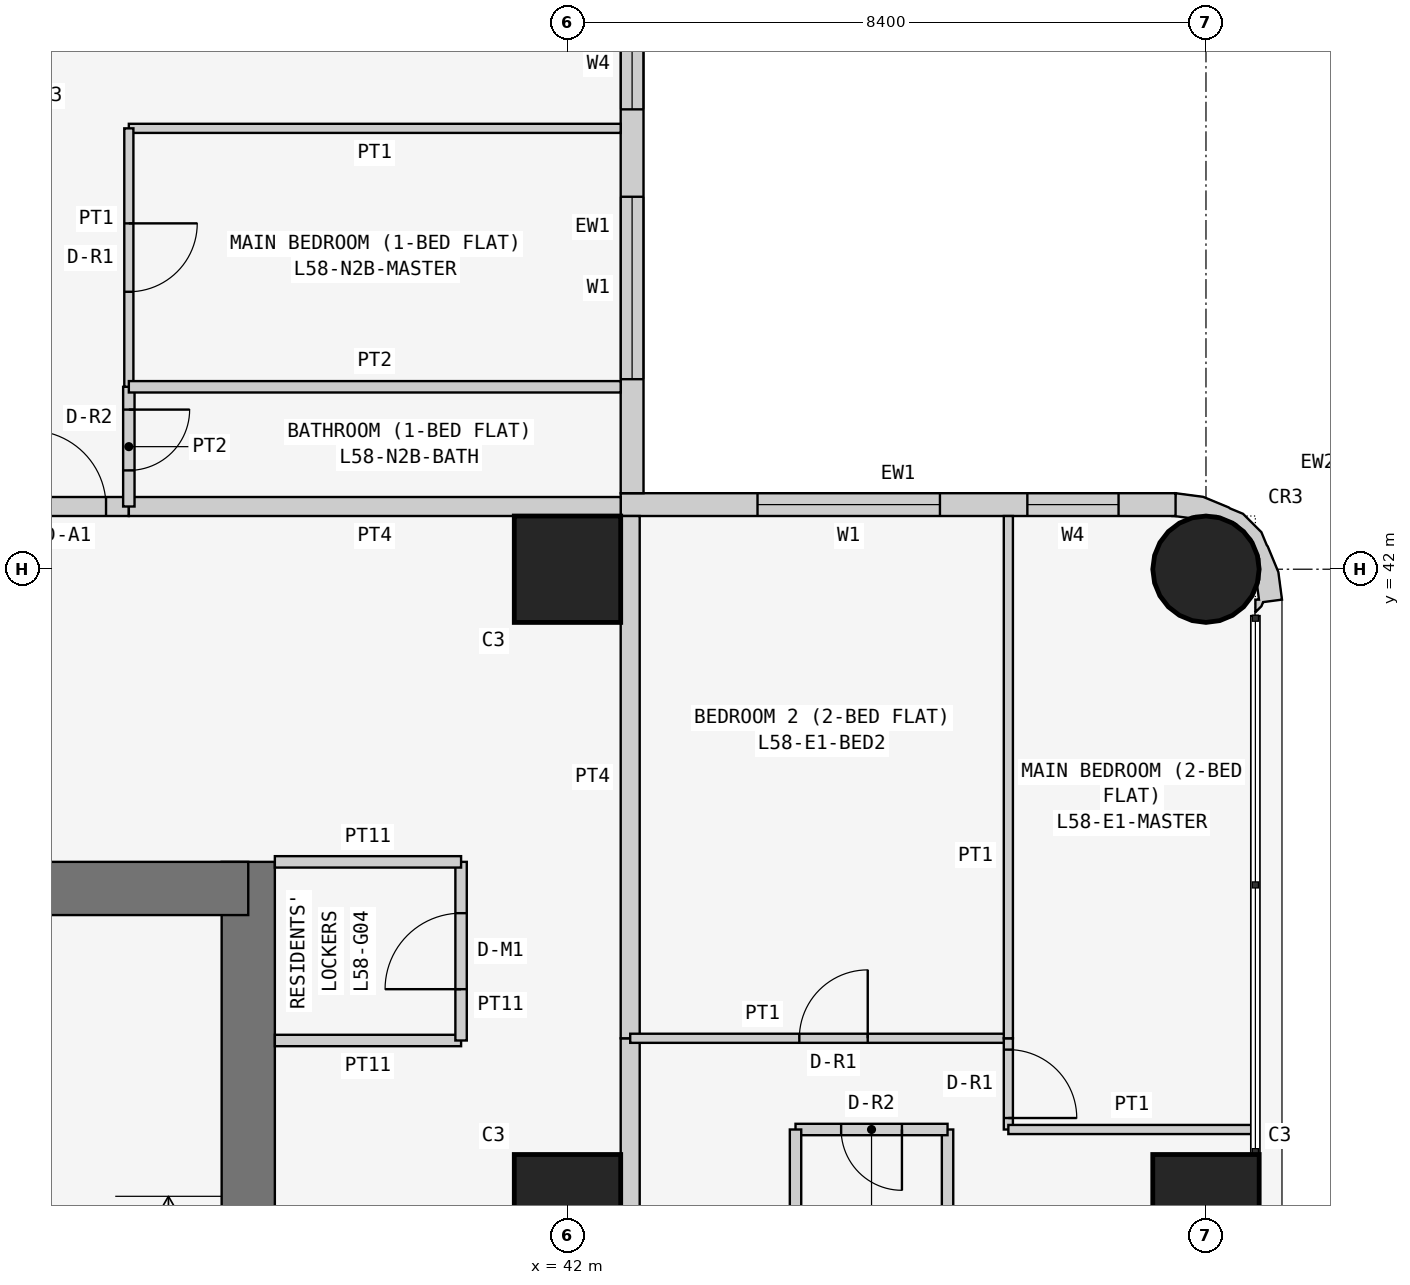
"""IFC4 building model, lengths in metres.
Left out: names, types, materials, properties, quantities, classifications, styles, units other than length and angle.
Written with IfcOpenShell. Run it as: python <this file> out.ifc"""

import sys

from ifc_helpers import new_model, si_unit, direction, frame, frame_2d, origin, origin_2d, place, context, subcontext, project, spatial, polyline, rectangle, circle, outline, extrude, element, fill, save


model = new_model("IFC4")
c1 = context("Model", 3, precision=1e-05, world=origin(), true_north=direction((0.0, 1.0)))
c2 = subcontext(c1, "Body", "Model", "MODEL_VIEW")
j1 = project(units=[si_unit("LENGTHUNIT", "METRE"), si_unit("PLANEANGLEUNIT", "RADIAN")], contexts=[c1])
p1 = place(None, origin())
s1 = spatial("IfcSite", under=j1, at=p1, CompositionType="ELEMENT")
p2 = place(p1, origin())
s2 = spatial("IfcBuilding", under=s1, at=p2, CompositionType="ELEMENT")
p3 = place(p2, frame((0.0, 0.0, 222.9)))
s3 = spatial("IfcBuildingStorey", under=s2, at=p3, CompositionType="ELEMENT", Elevation=222.9)
for number, where, z_axis, x_axis in (
    (1, (42.0, 33.6, 0.0), (0.0, 0.0, 1.0), (1.0, 0.0, 0.0)),
    (2, (42.0, 42.0, 0.0), (0.0, 0.0, 1.0), (1.0, 0.0, 0.0)),
    (3, (50.4, 33.6, 0.0), (0.0, 0.0, 1.0), (1.0, 0.0, 0.0)),
):
    element("IfcColumn", number, at=place(p3, frame(where, z_axis=z_axis, x_axis=x_axis)), inside=s3, PredefinedType="COLUMN", context=c2, shape_type="SweptSolid", body=[
        extrude(rectangle(XDim=1.4, YDim=1.4, at=origin_2d()), origin(), (0.0, 0.0, 1.0), 3.6),
    ])
p4 = place(p3, frame((50.4, 42.0, 0.0), z_axis=(0.0, 0.0, 1.0), x_axis=(1.0, 0.0, 0.0)))
e4 = element("IfcColumn", 4, at=p4, inside=s3, PredefinedType="COLUMN", context=c2, shape_type="SweptSolid", body=[
    extrude(circle(Radius=0.7, at=origin_2d()), origin(), (0.0, 0.0, 1.0), 3.6),
])
p5 = place(p3, frame((37.8, 21.0, 0.0), z_axis=(0.0, 0.0, 1.0), x_axis=(0.0, 1.0, 0.0)))
e5 = element("IfcWall", 5, at=p5, inside=s3, PredefinedType="SHEAR", context=c2, shape_type="SweptSolid", body=[
    extrude(rectangle(XDim=17.15, YDim=0.7, at=frame_2d((8.575, 0.0))), origin(), (0.0, 0.0, 1.0), 3.6),
])
p6 = place(p5, frame((5.2, 0.0, 0.0)))
e6 = element("IfcOpeningElement", 6, at=p6, cuts=e5, PredefinedType="OPENING", context=c2, shape_type="SweptSolid", body=[
    extrude(rectangle(XDim=1.2, YDim=2.1, at=frame_2d((0.6, 1.05))), frame((0.0, 0.36, 0.0), z_axis=(0.0, -1.0, 0.0), x_axis=(1.0, 0.0, 0.0)), (0.0, 0.0, 1.0), 0.72),
])
p7 = place(p3, frame((37.8, 37.8, 0.0), z_axis=(0.0, 0.0, 1.0), x_axis=(-1.0, 0.0, 0.0)))
e7 = element("IfcWall", 7, at=p7, inside=s3, PredefinedType="SHEAR", context=c2, shape_type="SweptSolid", body=[
    extrude(rectangle(XDim=17.15, YDim=0.7, at=frame_2d((8.575, 0.0))), origin(), (0.0, 0.0, 1.0), 3.6),
])
p8 = place(p3, frame((50.0, 42.85, 0.0), z_axis=(0.0, 0.0, 1.0), x_axis=(-1.0, 0.0, 0.0)))
e8 = element("IfcWall", 8, at=p8, inside=s3, PredefinedType="SOLIDWALL", context=c2, shape_type="SweptSolid", body=[
    extrude(rectangle(XDim=7.3, YDim=0.3, at=frame_2d((3.65, 0.0))), origin(), (0.0, 0.0, 1.0), 3.45),
])
p9 = place(p8, frame((3.1, 0.0, 0.9)))
e9 = element("IfcOpeningElement", 9, at=p9, cuts=e8, PredefinedType="OPENING", context=c2, shape_type="SweptSolid", body=[
    extrude(rectangle(XDim=2.4, YDim=1.5, at=frame_2d((1.2, 0.75))), frame((0.0, 0.16, 0.0), z_axis=(0.0, -1.0, 0.0), x_axis=(1.0, 0.0, 0.0)), (0.0, 0.0, 1.0), 0.32),
])
p10 = place(p8, frame((0.75, 0.0, 0.9)))
e10 = element("IfcOpeningElement", 10, at=p10, cuts=e8, PredefinedType="OPENING", context=c2, shape_type="SweptSolid", body=[
    extrude(rectangle(XDim=1.2, YDim=1.5, at=frame_2d((0.6, 0.75))), frame((0.0, 0.16, 0.0), z_axis=(0.0, -1.0, 0.0), x_axis=(1.0, 0.0, 0.0)), (0.0, 0.0, 1.0), 0.32),
])
p11 = place(p3, frame((42.85, 43.0, 0.0), z_axis=(0.0, 0.0, 1.0), x_axis=(0.0, 1.0, 0.0)))
e11 = element("IfcWall", 11, at=p11, inside=s3, PredefinedType="SOLIDWALL", context=c2, shape_type="SweptSolid", body=[
    extrude(rectangle(XDim=7.0, YDim=0.3, at=frame_2d((3.5, 0.0))), origin(), (0.0, 0.0, 1.0), 3.45),
])
p12 = place(p11, frame((1.5, 0.0, 0.9)))
e12 = element("IfcOpeningElement", 12, at=p12, cuts=e11, PredefinedType="OPENING", context=c2, shape_type="SweptSolid", body=[
    extrude(rectangle(XDim=2.4, YDim=1.5, at=frame_2d((1.2, 0.75))), frame((0.0, 0.16, 0.0), z_axis=(0.0, -1.0, 0.0), x_axis=(1.0, 0.0, 0.0)), (0.0, 0.0, 1.0), 0.32),
])
p13 = place(p11, frame((5.05, 0.0, 0.9)))
e13 = element("IfcOpeningElement", 13, at=p13, cuts=e11, PredefinedType="OPENING", context=c2, shape_type="SweptSolid", body=[
    extrude(rectangle(XDim=1.2, YDim=1.5, at=frame_2d((0.6, 0.75))), frame((0.0, 0.16, 0.0), z_axis=(0.0, -1.0, 0.0), x_axis=(1.0, 0.0, 0.0)), (0.0, 0.0, 1.0), 0.32),
])
p14 = place(p3, frame((50.988, 41.488, 0.0), z_axis=(0.0, 0.0, 1.0), x_axis=(0.898030234854, 0.439933741929, 0.0)))
e14 = element("IfcWall", 14, at=p14, inside=s3, PredefinedType="SOLIDWALL", context=c2, shape_type="SweptSolid", body=[
    extrude(outline(polyline([(0.138, -0.04), (0.182, -0.0), (0.419, -0.08), (0.536, 0.266), (0.559, 0.631), (0.555, 0.651), (0.566, 0.836), (0.455, 1.159), (0.333, 1.298), (0.324, 1.317), (0.082, 1.591), (-0.222, 1.793), (-0.39, 1.541), (-0.372, 1.532), (-0.195, 1.414), (-0.12, 1.41), (0.131, 1.287), (0.315, 1.078), (0.406, 0.814), (0.388, 0.536), (0.265, 0.285), (0.209, 0.235), (0.148, 0.053), (0.105, 0.074), (0.032, -0.076), (0.138, -0.04)])), origin(), (0.0, 0.0, 1.0), 3.45),
])
p15 = place(p3, frame((38.15, 35.8, 0.0), z_axis=(0.0, 0.0, 1.0), x_axis=(1.0, 0.0, 0.0)))
e15 = element("IfcWall", 15, at=p15, inside=s3, PredefinedType="PARTITIONING", context=c2, shape_type="SweptSolid", body=[
    extrude(rectangle(XDim=2.45, YDim=0.15, at=frame_2d((1.225, 0.0))), origin(), (0.0, 0.0, 1.0), 3.45),
])
p16 = place(p3, frame((40.6, 35.8, 0.0), z_axis=(0.0, 0.0, 1.0), x_axis=(0.0, 1.0, 0.0)))
e16 = element("IfcWall", 16, at=p16, inside=s3, PredefinedType="PARTITIONING", context=c2, shape_type="SweptSolid", body=[
    extrude(rectangle(XDim=2.35, YDim=0.15, at=frame_2d((1.175, 0.0))), origin(), (0.0, 0.0, 1.0), 3.45),
])
p17 = place(p16, frame((0.675, 0.0, 0.0)))
e17 = element("IfcOpeningElement", 17, at=p17, cuts=e16, PredefinedType="OPENING", context=c2, shape_type="SweptSolid", body=[
    extrude(rectangle(XDim=1.0, YDim=2.1, at=frame_2d((0.5, 1.05))), frame((0.0, 0.085, 0.0), z_axis=(0.0, -1.0, 0.0), x_axis=(1.0, 0.0, 0.0)), (0.0, 0.0, 1.0), 0.17),
])
p18 = place(p3, frame((40.6, 38.15, 0.0), z_axis=(0.0, 0.0, 1.0), x_axis=(-1.0, 0.0, 0.0)))
e18 = element("IfcWall", 18, at=p18, inside=s3, PredefinedType="PARTITIONING", context=c2, shape_type="SweptSolid", body=[
    extrude(rectangle(XDim=2.45, YDim=0.15, at=frame_2d((1.225, 0.0))), origin(), (0.0, 0.0, 1.0), 3.45),
])
p19 = place(p3, frame((34.629, 42.825, 0.0), z_axis=(0.0, 0.0, 1.0), x_axis=(1.0, 0.0, 0.0)))
e19 = element("IfcWall", 19, at=p19, inside=s3, PredefinedType="PARTITIONING", context=c2, shape_type="SweptSolid", body=[
    extrude(rectangle(XDim=1.6, YDim=0.25, at=frame_2d((0.8, 0.0))), origin(), (0.0, 0.0, 1.0), 3.45),
])
p20 = place(p19, frame((0.3, 0.0, 0.0)))
e20 = element("IfcOpeningElement", 20, at=p20, cuts=e19, PredefinedType="OPENING", context=c2, shape_type="SweptSolid", body=[
    extrude(rectangle(XDim=1.0, YDim=2.1, at=frame_2d((0.5, 1.05))), frame((0.0, 0.135, 0.0), z_axis=(0.0, -1.0, 0.0), x_axis=(1.0, 0.0, 0.0)), (0.0, 0.0, 1.0), 0.27),
])
p21 = place(p3, frame((36.229, 42.825, 0.0), z_axis=(0.0, 0.0, 1.0), x_axis=(1.0, 0.0, 0.0)))
e21 = element("IfcWall", 21, at=p21, inside=s3, PredefinedType="PARTITIONING", context=c2, shape_type="SweptSolid", body=[
    extrude(rectangle(XDim=6.471, YDim=0.25, at=frame_2d((3.235, 0.0))), origin(), (0.0, 0.0, 1.0), 3.45),
])
p22 = place(p3, frame((42.825, 35.829, 0.0), z_axis=(0.0, 0.0, 1.0), x_axis=(0.0, -1.0, 0.0)))
e22 = element("IfcWall", 22, at=p22, inside=s3, PredefinedType="PARTITIONING", context=c2, shape_type="SweptSolid", body=[
    extrude(rectangle(XDim=6.429, YDim=0.25, at=frame_2d((3.215, 0.0))), origin(), (0.0, 0.0, 1.0), 3.45),
])
p23 = place(p22, frame((4.929, 0.0, 0.0)))
e23 = element("IfcOpeningElement", 23, at=p23, cuts=e22, PredefinedType="OPENING", context=c2, shape_type="SweptSolid", body=[
    extrude(rectangle(XDim=1.0, YDim=2.1, at=frame_2d((0.5, 1.05))), frame((0.0, 0.135, 0.0), z_axis=(0.0, -1.0, 0.0), x_axis=(1.0, 0.0, 0.0)), (0.0, 0.0, 1.0), 0.27),
])
p24 = place(p3, frame((42.825, 42.7, 0.0), z_axis=(0.0, 0.0, 1.0), x_axis=(0.0, -1.0, 0.0)))
e24 = element("IfcWall", 24, at=p24, inside=s3, PredefinedType="PARTITIONING", context=c2, shape_type="SweptSolid", body=[
    extrude(rectangle(XDim=6.871, YDim=0.25, at=frame_2d((3.436, 0.0))), origin(), (0.0, 0.0, 1.0), 3.45),
])
p25 = place(p3, frame((36.229, 44.4, 0.0), z_axis=(0.0, 0.0, 1.0), x_axis=(0.0, -1.0, 0.0)))
e25 = element("IfcWall", 25, at=p25, inside=s3, PredefinedType="PARTITIONING", context=c2, shape_type="SweptSolid", body=[
    extrude(rectangle(XDim=1.575, YDim=0.15, at=frame_2d((0.788, 0.0))), origin(), (0.0, 0.0, 1.0), 3.45),
])
p26 = place(p25, frame((0.3, 0.0, 0.0)))
e26 = element("IfcOpeningElement", 26, at=p26, cuts=e25, PredefinedType="OPENING", context=c2, shape_type="SweptSolid", body=[
    extrude(rectangle(XDim=0.8, YDim=2.1, at=frame_2d((0.4, 1.05))), frame((0.0, 0.085, 0.0), z_axis=(0.0, -1.0, 0.0), x_axis=(1.0, 0.0, 0.0)), (0.0, 0.0, 1.0), 0.17),
])
p27 = place(p3, frame((42.7, 47.8, 0.0), z_axis=(0.0, 0.0, 1.0), x_axis=(-1.0, 0.0, 0.0)))
e27 = element("IfcWall", 27, at=p27, inside=s3, PredefinedType="PARTITIONING", context=c2, shape_type="SweptSolid", body=[
    extrude(rectangle(XDim=6.471, YDim=0.12, at=frame_2d((3.235, 0.0))), origin(), (0.0, 0.0, 1.0), 3.45),
])
p28 = place(p3, frame((36.229, 47.8, 0.0), z_axis=(0.0, 0.0, 1.0), x_axis=(0.0, -1.0, 0.0)))
e28 = element("IfcWall", 28, at=p28, inside=s3, PredefinedType="PARTITIONING", context=c2, shape_type="SweptSolid", body=[
    extrude(rectangle(XDim=3.4, YDim=0.12, at=frame_2d((1.7, 0.0))), origin(), (0.0, 0.0, 1.0), 3.45),
])
p29 = place(p28, frame((1.25, 0.0, 0.0)))
e29 = element("IfcOpeningElement", 29, at=p29, cuts=e28, PredefinedType="OPENING", context=c2, shape_type="SweptSolid", body=[
    extrude(rectangle(XDim=0.9, YDim=2.1, at=frame_2d((0.45, 1.05))), frame((0.0, 0.07, 0.0), z_axis=(0.0, -1.0, 0.0), x_axis=(1.0, 0.0, 0.0)), (0.0, 0.0, 1.0), 0.14),
])
p30 = place(p3, frame((36.229, 44.4, 0.0), z_axis=(0.0, 0.0, 1.0), x_axis=(1.0, 0.0, 0.0)))
e30 = element("IfcWall", 30, at=p30, inside=s3, PredefinedType="PARTITIONING", context=c2, shape_type="SweptSolid", body=[
    extrude(rectangle(XDim=6.471, YDim=0.15, at=frame_2d((3.235, 0.0))), origin(), (0.0, 0.0, 1.0), 3.45),
])
p31 = place(p3, frame((47.0, 29.4, 0.0), z_axis=(0.0, 0.0, 1.0), x_axis=(0.0, 1.0, 0.0)))
e31 = element("IfcWall", 31, at=p31, inside=s3, PredefinedType="PARTITIONING", context=c2, shape_type="SweptSolid", body=[
    extrude(rectangle(XDim=5.229, YDim=0.15, at=frame_2d((2.615, 0.0))), origin(), (0.0, 0.0, 1.0), 3.45),
])
p32 = place(p3, frame((47.0, 34.629, 0.0), z_axis=(0.0, 0.0, 1.0), x_axis=(-1.0, 0.0, 0.0)))
e32 = element("IfcWall", 32, at=p32, inside=s3, PredefinedType="PARTITIONING", context=c2, shape_type="SweptSolid", body=[
    extrude(rectangle(XDim=2.0, YDim=0.15, at=frame_2d((1.0, 0.0))), origin(), (0.0, 0.0, 1.0), 3.45),
])
p33 = place(p32, frame((0.6, 0.0, 0.0)))
e33 = element("IfcOpeningElement", 33, at=p33, cuts=e32, PredefinedType="OPENING", context=c2, shape_type="SweptSolid", body=[
    extrude(rectangle(XDim=0.8, YDim=2.1, at=frame_2d((0.4, 1.05))), frame((0.0, 0.085, 0.0), z_axis=(0.0, -1.0, 0.0), x_axis=(1.0, 0.0, 0.0)), (0.0, 0.0, 1.0), 0.17),
])
p34 = place(p3, frame((45.0, 34.629, 0.0), z_axis=(0.0, 0.0, 1.0), x_axis=(0.0, -1.0, 0.0)))
e34 = element("IfcWall", 34, at=p34, inside=s3, PredefinedType="PARTITIONING", context=c2, shape_type="SweptSolid", body=[
    extrude(rectangle(XDim=5.229, YDim=0.15, at=frame_2d((2.615, 0.0))), origin(), (0.0, 0.0, 1.0), 3.45),
])
p35 = place(p3, frame((42.825, 35.829, 0.0), z_axis=(0.0, 0.0, 1.0), x_axis=(1.0, 0.0, 0.0)))
e35 = element("IfcWall", 35, at=p35, inside=s3, PredefinedType="PARTITIONING", context=c2, shape_type="SweptSolid", body=[
    extrude(rectangle(XDim=4.975, YDim=0.12, at=frame_2d((2.488, 0.0))), origin(), (0.0, 0.0, 1.0), 3.45),
])
p36 = place(p35, frame((2.225, 0.0, 0.0)))
e36 = element("IfcOpeningElement", 36, at=p36, cuts=e35, PredefinedType="OPENING", context=c2, shape_type="SweptSolid", body=[
    extrude(rectangle(XDim=0.9, YDim=2.1, at=frame_2d((0.45, 1.05))), frame((0.0, 0.07, 0.0), z_axis=(0.0, -1.0, 0.0), x_axis=(1.0, 0.0, 0.0)), (0.0, 0.0, 1.0), 0.14),
])
p37 = place(p3, frame((47.8, 35.829, 0.0), z_axis=(0.0, 0.0, 1.0), x_axis=(0.0, -1.0, 0.0)))
e37 = element("IfcWall", 37, at=p37, inside=s3, PredefinedType="PARTITIONING", context=c2, shape_type="SweptSolid", body=[
    extrude(rectangle(XDim=1.2, YDim=0.12, at=frame_2d((0.6, 0.0))), origin(), (0.0, 0.0, 1.0), 3.45),
])
p38 = place(p37, frame((0.149, 0.0, 0.0)))
e38 = element("IfcOpeningElement", 38, at=p38, cuts=e37, PredefinedType="OPENING", context=c2, shape_type="SweptSolid", body=[
    extrude(rectangle(XDim=0.9, YDim=2.1, at=frame_2d((0.45, 1.05))), frame((0.0, 0.07, 0.0), z_axis=(0.0, -1.0, 0.0), x_axis=(1.0, 0.0, 0.0)), (0.0, 0.0, 1.0), 0.14),
])
p39 = place(p3, frame((47.8, 34.629, 0.0), z_axis=(0.0, 0.0, 1.0), x_axis=(1.0, 0.0, 0.0)))
e39 = element("IfcWall", 39, at=p39, inside=s3, PredefinedType="PARTITIONING", context=c2, shape_type="SweptSolid", body=[
    extrude(rectangle(XDim=3.25, YDim=0.12, at=frame_2d((1.625, 0.0))), origin(), (0.0, 0.0, 1.0), 3.45),
])
p40 = place(p3, frame((47.8, 35.829, 0.0), z_axis=(0.0, 0.0, 1.0), x_axis=(0.0, 1.0, 0.0)))
e40 = element("IfcWall", 40, at=p40, inside=s3, PredefinedType="PARTITIONING", context=c2, shape_type="SweptSolid", body=[
    extrude(rectangle(XDim=6.871, YDim=0.12, at=frame_2d((3.436, 0.0))), origin(), (0.0, 0.0, 1.0), 3.45),
])
p41 = place(p12, origin())
e41 = element("IfcWindow", 41, at=p41, inside=s3, PartitioningType="SINGLE_PANEL", PredefinedType="WINDOW", context=c2, shape_type="SweptSolid", body=[
    extrude(rectangle(XDim=2.4, YDim=1.5, at=frame_2d((1.2, 0.75))), frame((0.0, 0.03, 0.0), z_axis=(0.0, -1.0, 0.0), x_axis=(1.0, 0.0, 0.0)), (0.0, 0.0, 1.0), 0.06),
])
fill(e12, e41)
p42 = place(p13, origin())
e42 = element("IfcWindow", 42, at=p42, inside=s3, PartitioningType="SINGLE_PANEL", PredefinedType="WINDOW", context=c2, shape_type="SweptSolid", body=[
    extrude(rectangle(XDim=1.2, YDim=1.5, at=frame_2d((0.6, 0.75))), frame((0.0, 0.03, 0.0), z_axis=(0.0, -1.0, 0.0), x_axis=(1.0, 0.0, 0.0)), (0.0, 0.0, 1.0), 0.06),
])
fill(e13, e42)
p43 = place(p9, origin())
e43 = element("IfcWindow", 43, at=p43, inside=s3, PartitioningType="SINGLE_PANEL", PredefinedType="WINDOW", context=c2, shape_type="SweptSolid", body=[
    extrude(rectangle(XDim=2.4, YDim=1.5, at=frame_2d((1.2, 0.75))), frame((0.0, 0.03, 0.0), z_axis=(0.0, -1.0, 0.0), x_axis=(1.0, 0.0, 0.0)), (0.0, 0.0, 1.0), 0.06),
])
fill(e9, e43)
p44 = place(p10, origin())
e44 = element("IfcWindow", 44, at=p44, inside=s3, PartitioningType="SINGLE_PANEL", PredefinedType="WINDOW", context=c2, shape_type="SweptSolid", body=[
    extrude(rectangle(XDim=1.2, YDim=1.5, at=frame_2d((0.6, 0.75))), frame((0.0, 0.03, 0.0), z_axis=(0.0, -1.0, 0.0), x_axis=(1.0, 0.0, 0.0)), (0.0, 0.0, 1.0), 0.06),
])
fill(e10, e44)
p45 = place(p17, origin())
e45 = element("IfcDoor", 45, at=p45, inside=s3, OperationType="SINGLE_SWING_LEFT", PredefinedType="DOOR", context=c2, shape_type="SweptSolid", body=[
    extrude(rectangle(XDim=1.0, YDim=2.1, at=frame_2d((0.5, 1.05))), frame((0.0, 0.025, 0.0), z_axis=(0.0, -1.0, 0.0), x_axis=(1.0, 0.0, 0.0)), (0.0, 0.0, 1.0), 0.05),
])
fill(e17, e45)
p46 = place(p20, origin())
e46 = element("IfcDoor", 46, at=p46, inside=s3, OperationType="SINGLE_SWING_LEFT", PredefinedType="DOOR", context=c2, shape_type="SweptSolid", body=[
    extrude(rectangle(XDim=1.0, YDim=2.1, at=frame_2d((0.5, 1.05))), frame((0.0, 0.025, 0.0), z_axis=(0.0, -1.0, 0.0), x_axis=(1.0, 0.0, 0.0)), (0.0, 0.0, 1.0), 0.05),
])
fill(e20, e46)
p47 = place(p26, origin())
e47 = element("IfcDoor", 47, at=p47, inside=s3, OperationType="SINGLE_SWING_LEFT", PredefinedType="DOOR", context=c2, shape_type="SweptSolid", body=[
    extrude(rectangle(XDim=0.8, YDim=2.1, at=frame_2d((0.4, 1.05))), frame((0.0, 0.025, 0.0), z_axis=(0.0, -1.0, 0.0), x_axis=(1.0, 0.0, 0.0)), (0.0, 0.0, 1.0), 0.05),
])
fill(e26, e47)
p48 = place(p29, origin())
e48 = element("IfcDoor", 48, at=p48, inside=s3, OperationType="SINGLE_SWING_LEFT", PredefinedType="DOOR", context=c2, shape_type="SweptSolid", body=[
    extrude(rectangle(XDim=0.9, YDim=2.1, at=frame_2d((0.45, 1.05))), frame((0.0, 0.025, 0.0), z_axis=(0.0, -1.0, 0.0), x_axis=(1.0, 0.0, 0.0)), (0.0, 0.0, 1.0), 0.05),
])
fill(e29, e48)
p49 = place(p33, origin())
e49 = element("IfcDoor", 49, at=p49, inside=s3, OperationType="SINGLE_SWING_LEFT", PredefinedType="DOOR", context=c2, shape_type="SweptSolid", body=[
    extrude(rectangle(XDim=0.8, YDim=2.1, at=frame_2d((0.4, 1.05))), frame((0.0, 0.025, 0.0), z_axis=(0.0, -1.0, 0.0), x_axis=(1.0, 0.0, 0.0)), (0.0, 0.0, 1.0), 0.05),
])
fill(e33, e49)
p50 = place(p36, origin())
e50 = element("IfcDoor", 50, at=p50, inside=s3, OperationType="SINGLE_SWING_RIGHT", PredefinedType="DOOR", context=c2, shape_type="SweptSolid", body=[
    extrude(rectangle(XDim=0.9, YDim=2.1, at=frame_2d((0.45, 1.05))), frame((0.0, 0.025, 0.0), z_axis=(0.0, -1.0, 0.0), x_axis=(1.0, 0.0, 0.0)), (0.0, 0.0, 1.0), 0.05),
])
fill(e36, e50)
p51 = place(p38, origin())
e51 = element("IfcDoor", 51, at=p51, inside=s3, OperationType="SINGLE_SWING_RIGHT", PredefinedType="DOOR", context=c2, shape_type="SweptSolid", body=[
    extrude(rectangle(XDim=0.9, YDim=2.1, at=frame_2d((0.45, 1.05))), frame((0.0, 0.025, 0.0), z_axis=(0.0, -1.0, 0.0), x_axis=(1.0, 0.0, 0.0)), (0.0, 0.0, 1.0), 0.05),
])
fill(e38, e51)
save(model, sys.argv[1])
